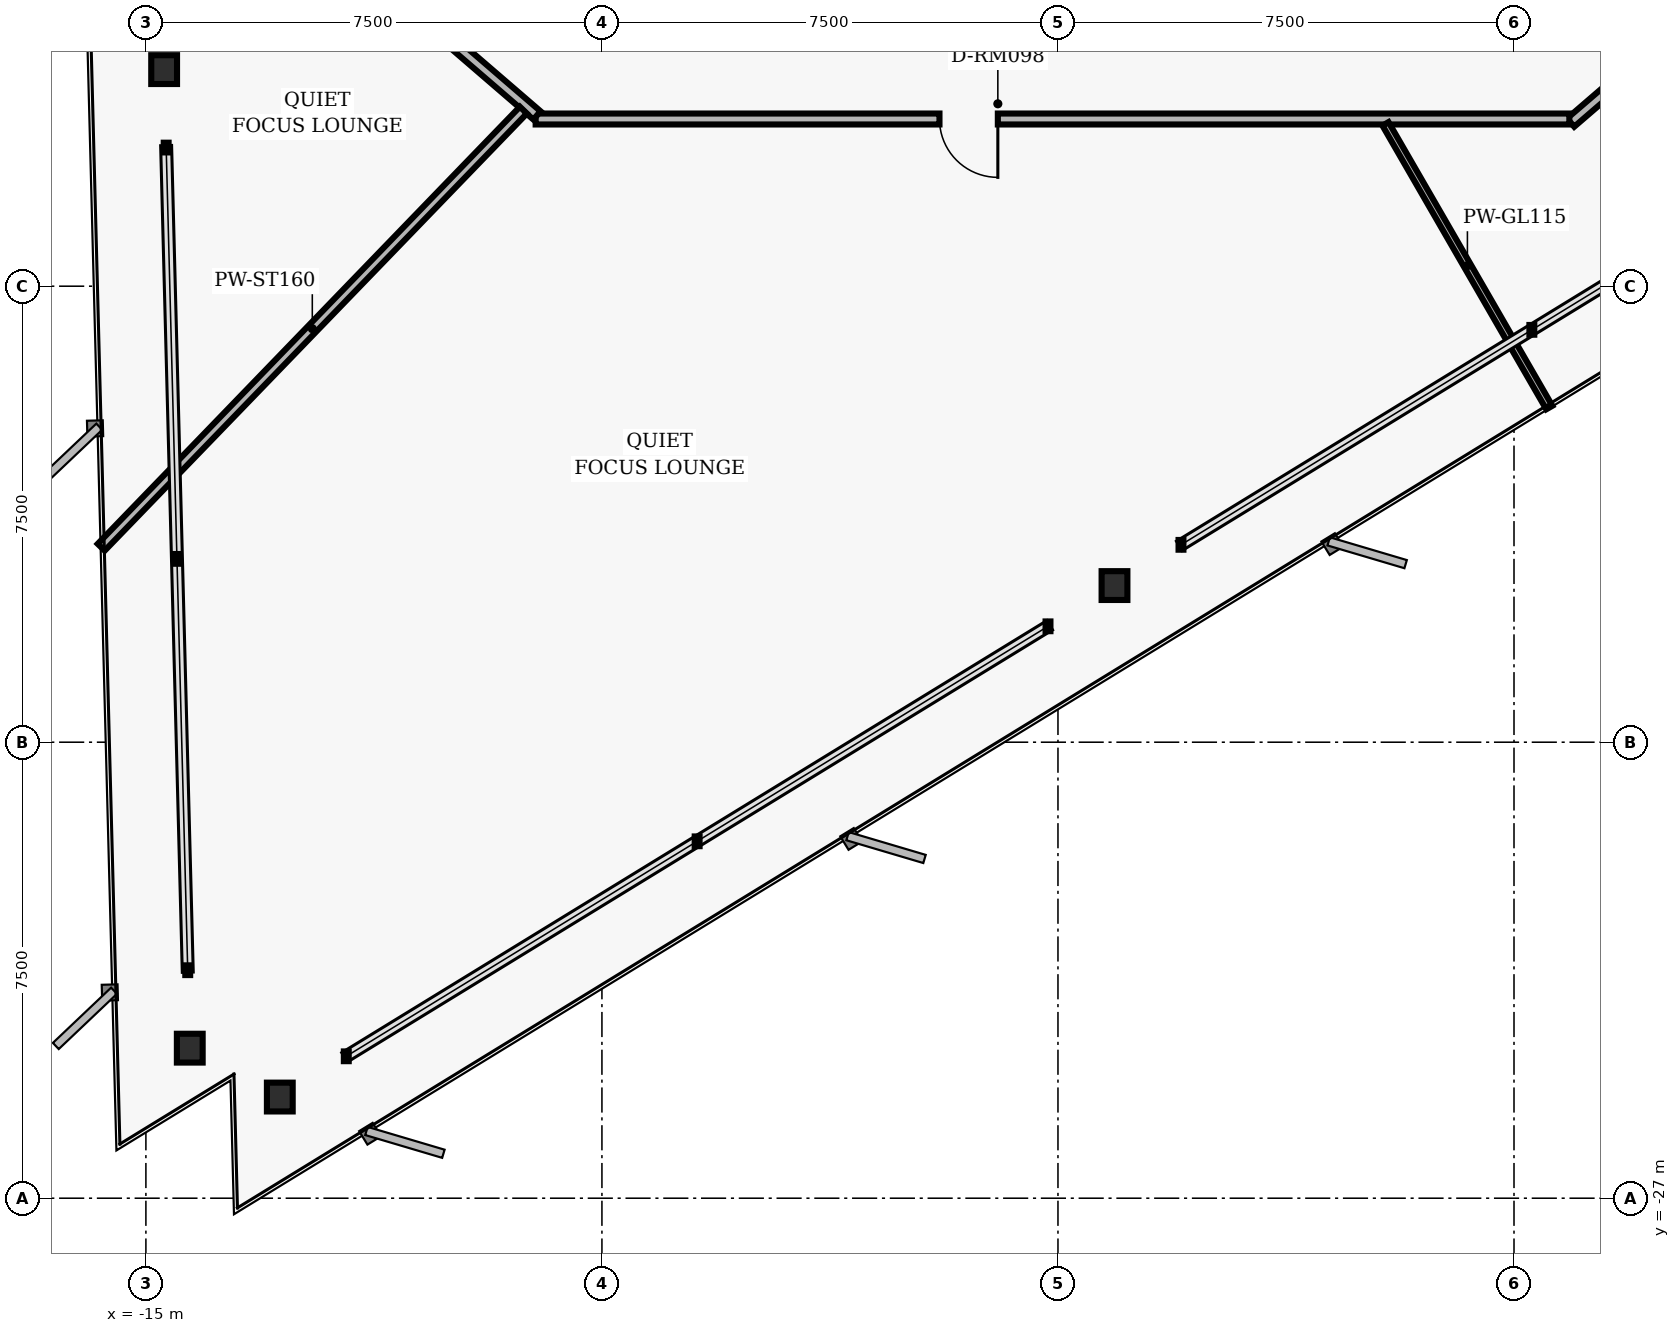
"""IFC4 building model, lengths in metres.
Left out: names, types, materials, properties, quantities, classifications, styles, units other than length and angle.
Written with IfcOpenShell. Run it as: python <this file> out.ifc"""

import sys

from ifc_helpers import new_model, si_unit, direction, frame, frame_2d, origin, origin_2d, place, context, subcontext, project, spatial, rectangle, i_section, extrude, element, fill, save


model = new_model("IFC4")
c1 = context("Model", 3, precision=1e-05, world=origin(), true_north=direction((0.0, 1.0)))
c2 = subcontext(c1, "Body", "Model", "MODEL_VIEW")
j1 = project(units=[si_unit("LENGTHUNIT", "METRE"), si_unit("PLANEANGLEUNIT", "RADIAN")], contexts=[c1])
p1 = place(None, origin())
s1 = spatial("IfcSite", under=j1, at=p1, CompositionType="ELEMENT")
p2 = place(p1, origin())
s2 = spatial("IfcBuilding", under=s1, at=p2, CompositionType="ELEMENT")
p3 = place(p2, frame((0.0, 0.0, 39.04)))
s3 = spatial("IfcBuildingStorey", under=s2, at=p3, CompositionType="ELEMENT", Elevation=39.04)
for number, where, z_axis, x_axis in (
    (1, (-14.7, -8.438, 0.0), (0.0, 0.0, 1.0), (1.0, 0.0, 0.0)),
    (2, (-14.279, -24.532, 0.0), (0.0, 0.0, 1.0), (1.0, 0.0, 0.0)),
    (3, (-12.798, -25.336, 0.0), (0.0, 0.0, 1.0), (1.0, 0.0, 0.0)),
    (4, (0.93, -16.924, 0.0), (0.0, 0.0, 1.0), (1.0, 0.0, 0.0)),
):
    element("IfcColumn", number, at=place(p3, frame(where, z_axis=z_axis, x_axis=x_axis)), inside=s3, PredefinedType="COLUMN", context=c2, shape_type="SweptSolid", body=[
        extrude(i_section(OverallWidth=0.424, OverallDepth=0.474, WebThickness=0.048, FlangeThickness=0.077, FilletRadius=0.025, at=origin_2d()), origin(), (0.0, 0.0, 1.0), 3.36),
    ])
p4 = place(p3, frame((13.268, -5.141, 0.0), z_axis=(0.0, 0.0, 1.0), x_axis=(-0.757534501725, -0.65279512766, 0.0)))
e5 = element("IfcWall", 5, at=p4, inside=s3, PredefinedType="PARTITIONING", context=c2, shape_type="SweptSolid", body=[
    extrude(rectangle(XDim=6.385, YDim=0.18, at=frame_2d((3.192, 0.0))), origin(), (0.0, 0.0, 1.0), 2.587),
])
p5 = place(p4, frame((2.712, 0.0, 0.0)))
e6 = element("IfcOpeningElement", 6, at=p5, cuts=e5, PredefinedType="OPENING", context=c2, shape_type="SweptSolid", body=[
    extrude(rectangle(XDim=0.96, YDim=2.02, at=frame_2d((0.48, 1.01))), frame((0.0, 0.1, 0.0), z_axis=(0.0, -1.0, 0.0), x_axis=(1.0, 0.0, 0.0)), (0.0, 0.0, 1.0), 0.2),
])
p6 = place(p3, frame((8.41, -9.25, 0.0), z_axis=(0.0, 0.0, 1.0), x_axis=(-1.0, 0.0, 0.0)))
e7 = element("IfcWall", 7, at=p6, inside=s3, PredefinedType="PARTITIONING", context=c2, shape_type="SweptSolid", body=[
    extrude(rectangle(XDim=17.0, YDim=0.18, at=frame_2d((8.5, 0.0))), origin(), (0.0, 0.0, 1.0), 2.587),
])
p7 = place(p6, frame((9.399, 0.0, 0.0)))
e8 = element("IfcOpeningElement", 8, at=p7, cuts=e7, PredefinedType="OPENING", context=c2, shape_type="SweptSolid", body=[
    extrude(rectangle(XDim=0.96, YDim=2.02, at=frame_2d((0.48, 1.01))), frame((0.0, 0.1, 0.0), z_axis=(0.0, -1.0, 0.0), x_axis=(1.0, 0.0, 0.0)), (0.0, 0.0, 1.0), 0.2),
])
p8 = place(p3, frame((-8.568, -9.191, 0.0), z_axis=(0.0, 0.0, 1.0), x_axis=(-0.757556899173, 0.652769135694, 0.0)))
e9 = element("IfcWall", 9, at=p8, inside=s3, PredefinedType="PARTITIONING", context=c2, shape_type="SweptSolid", body=[
    extrude(rectangle(XDim=6.204, YDim=0.18, at=frame_2d((3.102, 0.0))), origin(), (0.0, 0.0, 1.0), 3.073),
])
p9 = place(p3, frame((-8.792, -9.104, 0.0), z_axis=(0.0, 0.0, 1.0), x_axis=(-0.694663387969, -0.719334954952, 0.0)))
e10 = element("IfcWall", 10, at=p9, inside=s3, PredefinedType="PARTITIONING", context=c2, shape_type="SweptSolid", body=[
    extrude(rectangle(XDim=9.995, YDim=0.16, at=frame_2d((4.997, 0.0))), origin(), (0.0, 0.0, 1.0), 3.073),
])
p10 = place(p3, frame((5.387, -9.33, 0.0), z_axis=(0.0, 0.0, 1.0), x_axis=(0.500023165436, -0.866012028801, 0.0)))
e11 = element("IfcWall", 11, at=p10, inside=s3, PredefinedType="MOVABLE", context=c2, shape_type="SweptSolid", body=[
    extrude(rectangle(XDim=5.388, YDim=0.115, at=frame_2d((2.694, 0.0))), origin(), (0.0, 0.0, 1.0), 3.073),
])
p11 = place(p7, origin())
e12 = element("IfcDoor", 12, at=p11, inside=s3, OperationType="SINGLE_SWING_LEFT", PredefinedType="DOOR", context=c2, shape_type="SweptSolid", body=[
    extrude(rectangle(XDim=0.96, YDim=2.02, at=frame_2d((0.48, 1.01))), frame((0.0, 0.025, 0.0), z_axis=(0.0, -1.0, 0.0), x_axis=(1.0, 0.0, 0.0)), (0.0, 0.0, 1.0), 0.05),
])
fill(e8, e12)
save(model, sys.argv[1])
